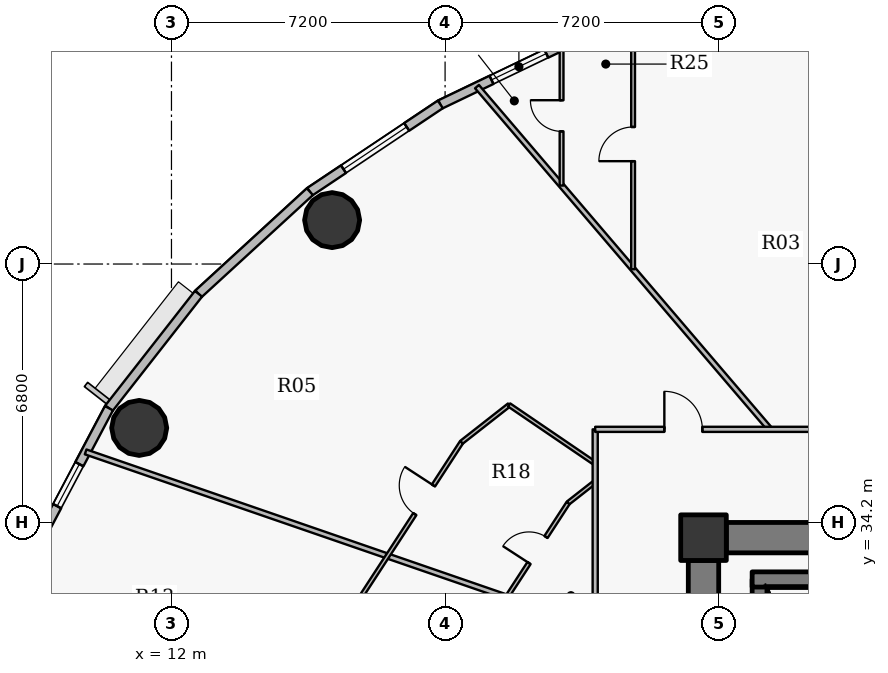
"""IFC4 building model, lengths in metres.
Left out: names, types, materials, properties, quantities, classifications, styles, units other than length and angle.
Written with IfcOpenShell. Run it as: python <this file> out.ifc"""

import sys

from ifc_helpers import new_model, si_unit, direction, frame, frame_2d, origin, origin_2d, place, context, subcontext, project, spatial, rectangle, hollow_circle, extrude, source, transform, mapped, element, fill, save


model = new_model("IFC4")
c1 = context("Model", 3, precision=1e-05, world=origin(), true_north=direction((0.0, 1.0)))
c2 = subcontext(c1, "Body", "Model", "MODEL_VIEW")
j1 = project(units=[si_unit("LENGTHUNIT", "METRE"), si_unit("PLANEANGLEUNIT", "RADIAN")], contexts=[c1])
p1 = place(None, origin())
s1 = spatial("IfcSite", under=j1, at=p1, CompositionType="ELEMENT")
p2 = place(p1, origin())
s2 = spatial("IfcBuilding", under=s1, at=p2, CompositionType="ELEMENT")
p3 = place(p2, frame((0.0, 0.0, 104.7)))
s3 = spatial("IfcBuildingStorey", under=s2, at=p3, CompositionType="ELEMENT", Elevation=104.7)
p4 = place(p3, frame((26.0, 33.8, 0.0), z_axis=(0.0, 0.0, 1.0), x_axis=(1.0, 0.0, 0.0)))
e1 = element("IfcColumn", 1, at=p4, inside=s3, PredefinedType="COLUMN", context=c2, shape_type="SweptSolid", body=[
    extrude(rectangle(XDim=1.2, YDim=1.2, at=origin_2d()), origin(), (0.0, 0.0, 1.0), 3.75),
])
p5 = place(p3, frame((27.48, 24.1, 0.0), z_axis=(0.0, 0.0, 1.0), x_axis=(0.0, 1.0, 0.0)))
e2 = element("IfcWall", 2, at=p5, inside=s3, PredefinedType="SHEAR", context=c2, shape_type="SweptSolid", body=[
    extrude(rectangle(XDim=8.6, YDim=0.4, at=frame_2d((4.3, 0.0))), origin(), (0.0, 0.0, 1.0), 3.75),
])
p6 = place(p3, frame((27.28, 32.7, 0.0), z_axis=(0.0, 0.0, 1.0), x_axis=(1.0, 0.0, 0.0)))
e3 = element("IfcWall", 3, at=p6, inside=s3, PredefinedType="SHEAR", context=c2, shape_type="SweptSolid", body=[
    extrude(rectangle(XDim=4.1, YDim=0.4, at=frame_2d((2.05, 0.0))), origin(), (0.0, 0.0, 1.0), 3.75),
])
p7 = place(p3, frame((26.6, 33.8, 0.0), z_axis=(0.0, 0.0, 1.0), x_axis=(1.0, 0.0, 0.0)))
e4 = element("IfcWall", 4, at=p7, inside=s3, PredefinedType="SHEAR", context=c2, shape_type="SweptSolid", body=[
    extrude(rectangle(XDim=18.8, YDim=0.8, at=frame_2d((9.4, 0.0))), origin(), (0.0, 0.0, 1.0), 2.95),
])
p8 = place(p3, frame((26.0, 20.8, 0.0), z_axis=(0.0, 0.0, 1.0), x_axis=(0.0, 1.0, 0.0)))
e5 = element("IfcWall", 5, at=p8, inside=s3, PredefinedType="SHEAR", context=c2, shape_type="SweptSolid", body=[
    extrude(rectangle(XDim=12.4, YDim=0.8, at=frame_2d((6.2, 0.0))), origin(), (0.0, 0.0, 1.0), 2.95),
])
p9 = place(p8, frame((5.79, 0.0, 0.0)))
e6 = element("IfcOpeningElement", 6, at=p9, cuts=e5, PredefinedType="OPENING", context=c2, shape_type="SweptSolid", body=[
    extrude(rectangle(XDim=0.82, YDim=2.1, at=origin_2d()), frame((0.41, 0.41, 1.05), z_axis=(0.0, -1.0, 0.0), x_axis=(1.0, 0.0, 0.0)), (0.0, 0.0, 1.0), 0.82),
])
for number, where, z_axis, x_axis in (
    (7, (16.227, 42.156, 0.0), (0.0, 0.0, 1.0), (1.0, 0.0, 0.0)),
    (8, (11.151, 36.688, 0.0), (0.0, 0.0, 1.0), (1.0, 0.0, 0.0)),
):
    element("IfcColumn", number, at=place(p3, frame(where, z_axis=z_axis, x_axis=x_axis)), inside=s3, PredefinedType="COLUMN", context=c2, shape_type="SweptSolid", body=[
        extrude(hollow_circle(Radius=0.725, WallThickness=0.042, at=origin_2d()), origin(), (0.0, 0.0, 1.0), 3.75),
    ])
p10 = place(p3, frame((19.075, 45.199, 0.0), z_axis=(0.0, 0.0, 1.0), x_axis=(0.901589935876, 0.432591709962, 0.0)))
e9 = element("IfcWall", 9, at=p10, inside=s3, PredefinedType="SOLIDWALL", context=c2, shape_type="SweptSolid", body=[
    extrude(rectangle(XDim=4.272, YDim=0.24, at=frame_2d((2.136, 0.0))), origin(), (0.0, 0.0, 1.0), 3.5),
])
p11 = place(p10, frame((1.493, 0.0, 0.9)))
e10 = element("IfcOpeningElement", 10, at=p11, cuts=e9, PredefinedType="OPENING", context=c2, shape_type="SweptSolid", body=[
    extrude(rectangle(XDim=1.6, YDim=1.75, at=origin_2d()), frame((0.8, 0.13, 0.875), z_axis=(0.0, -1.0, 0.0), x_axis=(1.0, 0.0, 0.0)), (0.0, 0.0, 1.0), 0.26),
])
p12 = place(p3, frame((15.642, 42.903, 0.0), z_axis=(0.0, 0.0, 1.0), x_axis=(0.831221811447, 0.555940914284, 0.0)))
e11 = element("IfcWall", 11, at=p12, inside=s3, PredefinedType="SOLIDWALL", context=c2, shape_type="SweptSolid", body=[
    extrude(rectangle(XDim=4.13, YDim=0.24, at=frame_2d((2.065, 0.0))), origin(), (0.0, 0.0, 1.0), 3.5),
])
p13 = place(p12, frame((1.065, 0.0, 0.9)))
e12 = element("IfcOpeningElement", 12, at=p13, cuts=e11, PredefinedType="OPENING", context=c2, shape_type="SweptSolid", body=[
    extrude(rectangle(XDim=2.0, YDim=1.75, at=origin_2d()), frame((1.0, 0.13, 0.875), z_axis=(0.0, -1.0, 0.0), x_axis=(1.0, 0.0, 0.0)), (0.0, 0.0, 1.0), 0.26),
])
p14 = place(p3, frame((12.711, 40.217, 0.0), z_axis=(0.0, 0.0, 1.0), x_axis=(0.737113356241, 0.675769117414, 0.0)))
e13 = element("IfcWall", 13, at=p14, inside=s3, PredefinedType="SOLIDWALL", context=c2, shape_type="SweptSolid", body=[
    extrude(rectangle(XDim=3.976, YDim=0.24, at=frame_2d((1.988, 0.0))), origin(), (0.0, 0.0, 1.0), 3.5),
])
p15 = place(p3, frame((10.355, 37.206, 0.0), z_axis=(0.0, 0.0, 1.0), x_axis=(0.616272103517, 0.787533297345, 0.0)))
e14 = element("IfcWall", 14, at=p15, inside=s3, PredefinedType="SOLIDWALL", context=c2, shape_type="SweptSolid", body=[
    extrude(rectangle(XDim=3.823, YDim=0.24, at=frame_2d((1.912, 0.0))), origin(), (0.0, 0.0, 1.0), 3.5),
])
p16 = place(p3, frame((8.63, 33.945, 0.0), z_axis=(0.0, 0.0, 1.0), x_axis=(0.467614004126, 0.883932770716, 0.0)))
e15 = element("IfcWall", 15, at=p16, inside=s3, PredefinedType="SOLIDWALL", context=c2, shape_type="SweptSolid", body=[
    extrude(rectangle(XDim=3.689, YDim=0.24, at=frame_2d((1.844, 0.0))), origin(), (0.0, 0.0, 1.0), 3.5),
])
p17 = place(p16, frame((0.774, 0.0, 0.9)))
e16 = element("IfcOpeningElement", 16, at=p17, cuts=e15, PredefinedType="OPENING", context=c2, shape_type="SweptSolid", body=[
    extrude(rectangle(XDim=1.25, YDim=1.65, at=origin_2d()), frame((0.625, 0.13, 0.825), z_axis=(0.0, -1.0, 0.0), x_axis=(1.0, 0.0, 0.0)), (0.0, 0.0, 1.0), 0.26),
])
p18 = place(p3, frame((9.741, 36.057, 0.0), z_axis=(0.0, 0.0, 1.0), x_axis=(0.945349748634, -0.326058051207, 0.0)))
e17 = element("IfcWall", 17, at=p18, inside=s3, PredefinedType="PARTITIONING", context=c2, shape_type="SweptSolid", body=[
    extrude(rectangle(XDim=14.184, YDim=0.135, at=frame_2d((7.092, 0.0))), origin(), (0.0, 0.0, 1.0), 2.935),
])
p19 = place(p3, frame((16.76, 31.895, 0.0), z_axis=(0.0, 0.0, 1.0), x_axis=(0.545405249109, 0.838172484781, 0.0)))
e18 = element("IfcWall", 18, at=p19, inside=s3, PredefinedType="PARTITIONING", context=c2, shape_type="SweptSolid", body=[
    extrude(rectangle(XDim=5.269, YDim=0.1, at=frame_2d((2.634, 0.0))), origin(), (0.0, 0.0, 1.0), 2.935),
])
p20 = place(p19, frame((3.012, 0.0, 0.0)))
e19 = element("IfcOpeningElement", 19, at=p20, cuts=e18, PredefinedType="OPENING", context=c2, shape_type="SweptSolid", body=[
    extrude(rectangle(XDim=0.9, YDim=2.1, at=origin_2d()), frame((0.45, 0.06, 1.05), z_axis=(0.0, -1.0, 0.0), x_axis=(1.0, 0.0, 0.0)), (0.0, 0.0, 1.0), 0.12),
])
p21 = place(p3, frame((19.634, 36.311, 0.0), z_axis=(0.0, 0.0, 1.0), x_axis=(0.787313775385, 0.616552527437, 0.0)))
e20 = element("IfcWall", 20, at=p21, inside=s3, PredefinedType="PARTITIONING", context=c2, shape_type="SweptSolid", body=[
    extrude(rectangle(XDim=1.59, YDim=0.1, at=frame_2d((0.795, 0.0))), origin(), (0.0, 0.0, 1.0), 3.5),
])
p22 = place(p3, frame((20.04, 45.668, 0.0), z_axis=(0.0, 0.0, 1.0), x_axis=(0.649828321201, -0.760081017369, 0.0)))
e21 = element("IfcWall", 21, at=p22, inside=s3, PredefinedType="PARTITIONING", context=c2, shape_type="SweptSolid", body=[
    extrude(rectangle(XDim=11.865, YDim=0.135, at=frame_2d((5.932, 0.0))), origin(), (0.0, 0.0, 1.0), 2.935),
])
p23 = place(p3, frame((20.825, 32.234, 0.0), z_axis=(0.0, 0.0, 1.0), x_axis=(0.545376787896, 0.838191004023, 0.0)))
e22 = element("IfcWall", 22, at=p23, inside=s3, PredefinedType="PARTITIONING", context=c2, shape_type="SweptSolid", body=[
    extrude(rectangle(XDim=2.96, YDim=0.1, at=frame_2d((1.48, 0.0))), origin(), (0.0, 0.0, 1.0), 2.935),
])
p24 = place(p23, frame((1.07, 0.0, 0.0)))
e23 = element("IfcOpeningElement", 23, at=p24, cuts=e22, PredefinedType="OPENING", context=c2, shape_type="SweptSolid", body=[
    extrude(rectangle(XDim=0.82, YDim=2.1, at=origin_2d()), frame((0.41, 0.06, 1.05), z_axis=(0.0, -1.0, 0.0), x_axis=(1.0, 0.0, 0.0)), (0.0, 0.0, 1.0), 0.12),
])
p25 = place(p3, frame((20.885, 37.291, 0.0), z_axis=(0.0, 0.0, 1.0), x_axis=(0.826581607155, -0.562816885596, 0.0)))
e24 = element("IfcWall", 24, at=p25, inside=s3, PredefinedType="PARTITIONING", context=c2, shape_type="SweptSolid", body=[
    extrude(rectangle(XDim=2.74, YDim=0.1, at=frame_2d((1.37, 0.0))), origin(), (0.0, 0.0, 1.0), 3.5),
])
p26 = place(p3, frame((22.265, 43.064, 0.0), z_axis=(0.0, 0.0, 1.0), x_axis=(0.0, 1.0, 0.0)))
e25 = element("IfcWall", 25, at=p26, inside=s3, PredefinedType="PARTITIONING", context=c2, shape_type="SweptSolid", body=[
    extrude(rectangle(XDim=3.671, YDim=0.1, at=frame_2d((1.836, 0.0))), origin(), (0.0, 0.0, 1.0), 2.935),
])
p27 = place(p26, frame((1.426, 0.0, 0.0)))
e26 = element("IfcOpeningElement", 26, at=p27, cuts=e25, PredefinedType="OPENING", context=c2, shape_type="SweptSolid", body=[
    extrude(rectangle(XDim=0.82, YDim=2.1, at=origin_2d()), frame((0.41, 0.06, 1.05), z_axis=(0.0, -1.0, 0.0), x_axis=(1.0, 0.0, 0.0)), (0.0, 0.0, 1.0), 0.12),
])
p28 = place(p3, frame((22.439, 34.715, 0.0), z_axis=(0.0, 0.0, 1.0), x_axis=(0.787265250498, 0.616614486821, 0.0)))
e27 = element("IfcWall", 27, at=p28, inside=s3, PredefinedType="PARTITIONING", context=c2, shape_type="SweptSolid", body=[
    extrude(rectangle(XDim=0.903, YDim=0.1, at=frame_2d((0.451, 0.0))), origin(), (0.0, 0.0, 1.0), 3.5),
])
p29 = place(p3, frame((23.15, 17.35, 0.0), z_axis=(0.0, 0.0, 1.0), x_axis=(0.0, 1.0, 0.0)))
e28 = element("IfcWall", 28, at=p29, inside=s3, PredefinedType="PARTITIONING", context=c2, shape_type="SweptSolid", body=[
    extrude(rectangle(XDim=19.3, YDim=0.135, at=frame_2d((9.65, 0.0))), origin(), (0.0, 0.0, 1.0), 2.935),
])
p30 = place(p29, frame((7.86, 0.0, 0.0)))
e29 = element("IfcOpeningElement", 29, at=p30, cuts=e28, PredefinedType="OPENING", context=c2, shape_type="SweptSolid", body=[
    extrude(rectangle(XDim=1.0, YDim=2.15, at=origin_2d()), frame((0.5, 0.078, 1.075), z_axis=(0.0, -1.0, 0.0), x_axis=(1.0, 0.0, 0.0)), (0.0, 0.0, 1.0), 0.155),
])
p31 = place(p3, frame((23.15, 36.65, 0.0), z_axis=(0.0, 0.0, 1.0), x_axis=(1.0, 0.0, 0.0)))
e30 = element("IfcWall", 30, at=p31, inside=s3, PredefinedType="PARTITIONING", context=c2, shape_type="SweptSolid", body=[
    extrude(rectangle(XDim=10.373, YDim=0.135, at=frame_2d((5.187, 0.0))), origin(), (0.0, 0.0, 1.0), 2.935),
])
p32 = place(p31, frame((6.966, 0.0, 0.0)))
e31 = element("IfcOpeningElement", 31, at=p32, cuts=e30, PredefinedType="OPENING", context=c2, shape_type="SweptSolid", body=[
    extrude(rectangle(XDim=1.0, YDim=2.15, at=origin_2d()), frame((0.5, 0.078, 1.075), z_axis=(0.0, -1.0, 0.0), x_axis=(1.0, 0.0, 0.0)), (0.0, 0.0, 1.0), 0.155),
])
p33 = place(p31, frame((1.82, 0.0, 0.0)))
e32 = element("IfcOpeningElement", 32, at=p33, cuts=e30, PredefinedType="OPENING", context=c2, shape_type="SweptSolid", body=[
    extrude(rectangle(XDim=1.0, YDim=2.15, at=origin_2d()), frame((0.5, 0.078, 1.075), z_axis=(0.0, -1.0, 0.0), x_axis=(1.0, 0.0, 0.0)), (0.0, 0.0, 1.0), 0.155),
])
p34 = place(p3, frame((24.147, 40.864, 0.0), z_axis=(0.0, 0.0, 1.0), x_axis=(0.0, 1.0, 0.0)))
e33 = element("IfcWall", 33, at=p34, inside=s3, PredefinedType="PARTITIONING", context=c2, shape_type="SweptSolid", body=[
    extrude(rectangle(XDim=6.585, YDim=0.1, at=frame_2d((3.292, 0.0))), origin(), (0.0, 0.0, 1.0), 2.935),
])
p35 = place(p34, frame((2.843, 0.0, 0.0)))
e34 = element("IfcOpeningElement", 34, at=p35, cuts=e33, PredefinedType="OPENING", context=c2, shape_type="SweptSolid", body=[
    extrude(rectangle(XDim=0.9, YDim=2.1, at=origin_2d()), frame((0.45, 0.06, 1.05), z_axis=(0.0, -1.0, 0.0), x_axis=(1.0, 0.0, 0.0)), (0.0, 0.0, 1.0), 0.12),
])
p36 = place(p3, frame((26.59, 34.2, 0.0), z_axis=(0.0, 0.0, 1.0), x_axis=(-1.0, 0.0, 0.0)))
e35 = element("IfcWall", 35, at=p36, inside=s3, PredefinedType="PARTITIONING", context=c2, shape_type="SweptSolid", body=[
    extrude(rectangle(XDim=0.99, YDim=0.135, at=frame_2d((0.495, 0.0))), origin(), (0.0, 0.0, 1.0), 2.935),
])
p37 = place(p3, frame((25.6, 33.893, 0.0), z_axis=(0.0, 0.0, 1.0), x_axis=(0.0, -1.0, 0.0)))
e36 = element("IfcWall", 36, at=p37, inside=s3, PredefinedType="PARTITIONING", context=c2, shape_type="SweptSolid", body=[
    extrude(rectangle(XDim=0.683, YDim=0.135, at=frame_2d((0.341, 0.0))), origin(), (0.0, 0.0, 1.0), 3.5),
])
m1 = source(origin(), c2, "Body", "SweptSolid", [
    extrude(rectangle(XDim=1.6, YDim=1.75, at=origin_2d()), frame((0.8, 0.03, 0.875), z_axis=(0.0, -1.0, 0.0), x_axis=(1.0, 0.0, 0.0)), (0.0, 0.0, 1.0), 0.06),
])
p38 = place(p11, origin())
e37 = element("IfcWindow", 37, at=p38, inside=s3, PartitioningType="DOUBLE_PANEL_VERTICAL", PredefinedType="WINDOW", context=c2, shape_type="MappedRepresentation", body=[
    mapped(m1, transform((0.0, 0.0, 0.0), x_axis=(1.0, 0.0, 0.0), y_axis=(0.0, 1.0, 0.0), z_axis=(0.0, 0.0, 1.0), scale=1.0)),
])
fill(e10, e37)
m2 = source(origin(), c2, "Body", "SweptSolid", [
    extrude(rectangle(XDim=2.0, YDim=1.75, at=origin_2d()), frame((1.0, 0.03, 0.875), z_axis=(0.0, -1.0, 0.0), x_axis=(1.0, 0.0, 0.0)), (0.0, 0.0, 1.0), 0.06),
])
p39 = place(p13, origin())
e38 = element("IfcWindow", 38, at=p39, inside=s3, PartitioningType="DOUBLE_PANEL_VERTICAL", PredefinedType="WINDOW", context=c2, shape_type="MappedRepresentation", body=[
    mapped(m2, transform((0.0, 0.0, 0.0), x_axis=(1.0, 0.0, 0.0), y_axis=(0.0, 1.0, 0.0), z_axis=(0.0, 0.0, 1.0), scale=1.0)),
])
fill(e12, e38)
m3 = source(origin(), c2, "Body", "SweptSolid", [
    extrude(rectangle(XDim=1.25, YDim=1.65, at=origin_2d()), frame((0.625, 0.03, 0.825), z_axis=(0.0, -1.0, 0.0), x_axis=(1.0, 0.0, 0.0)), (0.0, 0.0, 1.0), 0.06),
])
p40 = place(p17, origin())
e39 = element("IfcWindow", 39, at=p40, inside=s3, PartitioningType="SINGLE_PANEL", PredefinedType="WINDOW", context=c2, shape_type="MappedRepresentation", body=[
    mapped(m3, transform((0.0, 0.0, 0.0), x_axis=(1.0, 0.0, 0.0), y_axis=(0.0, 1.0, 0.0), z_axis=(0.0, 0.0, 1.0), scale=1.0)),
])
fill(e16, e39)
m4 = source(origin(), c2, "Body", "SweptSolid", [
    extrude(rectangle(XDim=0.9, YDim=2.1, at=origin_2d()), frame((0.45, 0.025, 1.05), z_axis=(0.0, -1.0, 0.0), x_axis=(1.0, 0.0, 0.0)), (0.0, 0.0, 1.0), 0.05),
])
p41 = place(p35, origin())
e40 = element("IfcDoor", 40, at=p41, inside=s3, OperationType="SINGLE_SWING_LEFT", PredefinedType="DOOR", context=c2, shape_type="MappedRepresentation", body=[
    mapped(m4, transform((0.0, 0.0, 0.0), x_axis=(1.0, 0.0, 0.0), y_axis=(0.0, 1.0, 0.0), z_axis=(0.0, 0.0, 1.0), scale=1.0)),
])
fill(e34, e40)
m5 = source(origin(), c2, "Body", "SweptSolid", [
    extrude(rectangle(XDim=0.82, YDim=2.1, at=origin_2d()), frame((0.41, 0.025, 1.05), z_axis=(0.0, -1.0, 0.0), x_axis=(1.0, 0.0, 0.0)), (0.0, 0.0, 1.0), 0.05),
])
p42 = place(p27, origin())
e41 = element("IfcDoor", 41, at=p42, inside=s3, OperationType="SINGLE_SWING_RIGHT", PredefinedType="DOOR", context=c2, shape_type="MappedRepresentation", body=[
    mapped(m5, transform((0.0, 0.0, 0.0), x_axis=(1.0, 0.0, 0.0), y_axis=(0.0, 1.0, 0.0), z_axis=(0.0, 0.0, 1.0), scale=1.0)),
])
fill(e26, e41)
m6 = source(origin(), c2, "Body", "SweptSolid", [
    extrude(rectangle(XDim=1.0, YDim=2.15, at=origin_2d()), frame((0.5, 0.025, 1.075), z_axis=(0.0, -1.0, 0.0), x_axis=(1.0, 0.0, 0.0)), (0.0, 0.0, 1.0), 0.05),
])
p43 = place(p33, origin())
e42 = element("IfcDoor", 42, at=p43, inside=s3, OperationType="SINGLE_SWING_LEFT", PredefinedType="DOOR", context=c2, shape_type="MappedRepresentation", body=[
    mapped(m6, transform((0.0, 0.0, 0.0), x_axis=(1.0, 0.0, 0.0), y_axis=(0.0, 1.0, 0.0), z_axis=(0.0, 0.0, 1.0), scale=1.0)),
])
fill(e32, e42)
p44 = place(p20, origin())
e43 = element("IfcDoor", 43, at=p44, inside=s3, OperationType="SINGLE_SWING_RIGHT", PredefinedType="DOOR", context=c2, shape_type="MappedRepresentation", body=[
    mapped(m4, transform((0.0, 0.0, 0.0), x_axis=(1.0, 0.0, 0.0), y_axis=(0.0, 1.0, 0.0), z_axis=(0.0, 0.0, 1.0), scale=1.0)),
])
fill(e19, e43)
p45 = place(p24, origin())
e44 = element("IfcDoor", 44, at=p45, inside=s3, OperationType="SINGLE_SWING_LEFT", PredefinedType="DOOR", context=c2, shape_type="MappedRepresentation", body=[
    mapped(m5, transform((0.0, 0.0, 0.0), x_axis=(1.0, 0.0, 0.0), y_axis=(0.0, 1.0, 0.0), z_axis=(0.0, 0.0, 1.0), scale=1.0)),
])
fill(e23, e44)
save(model, sys.argv[1])
